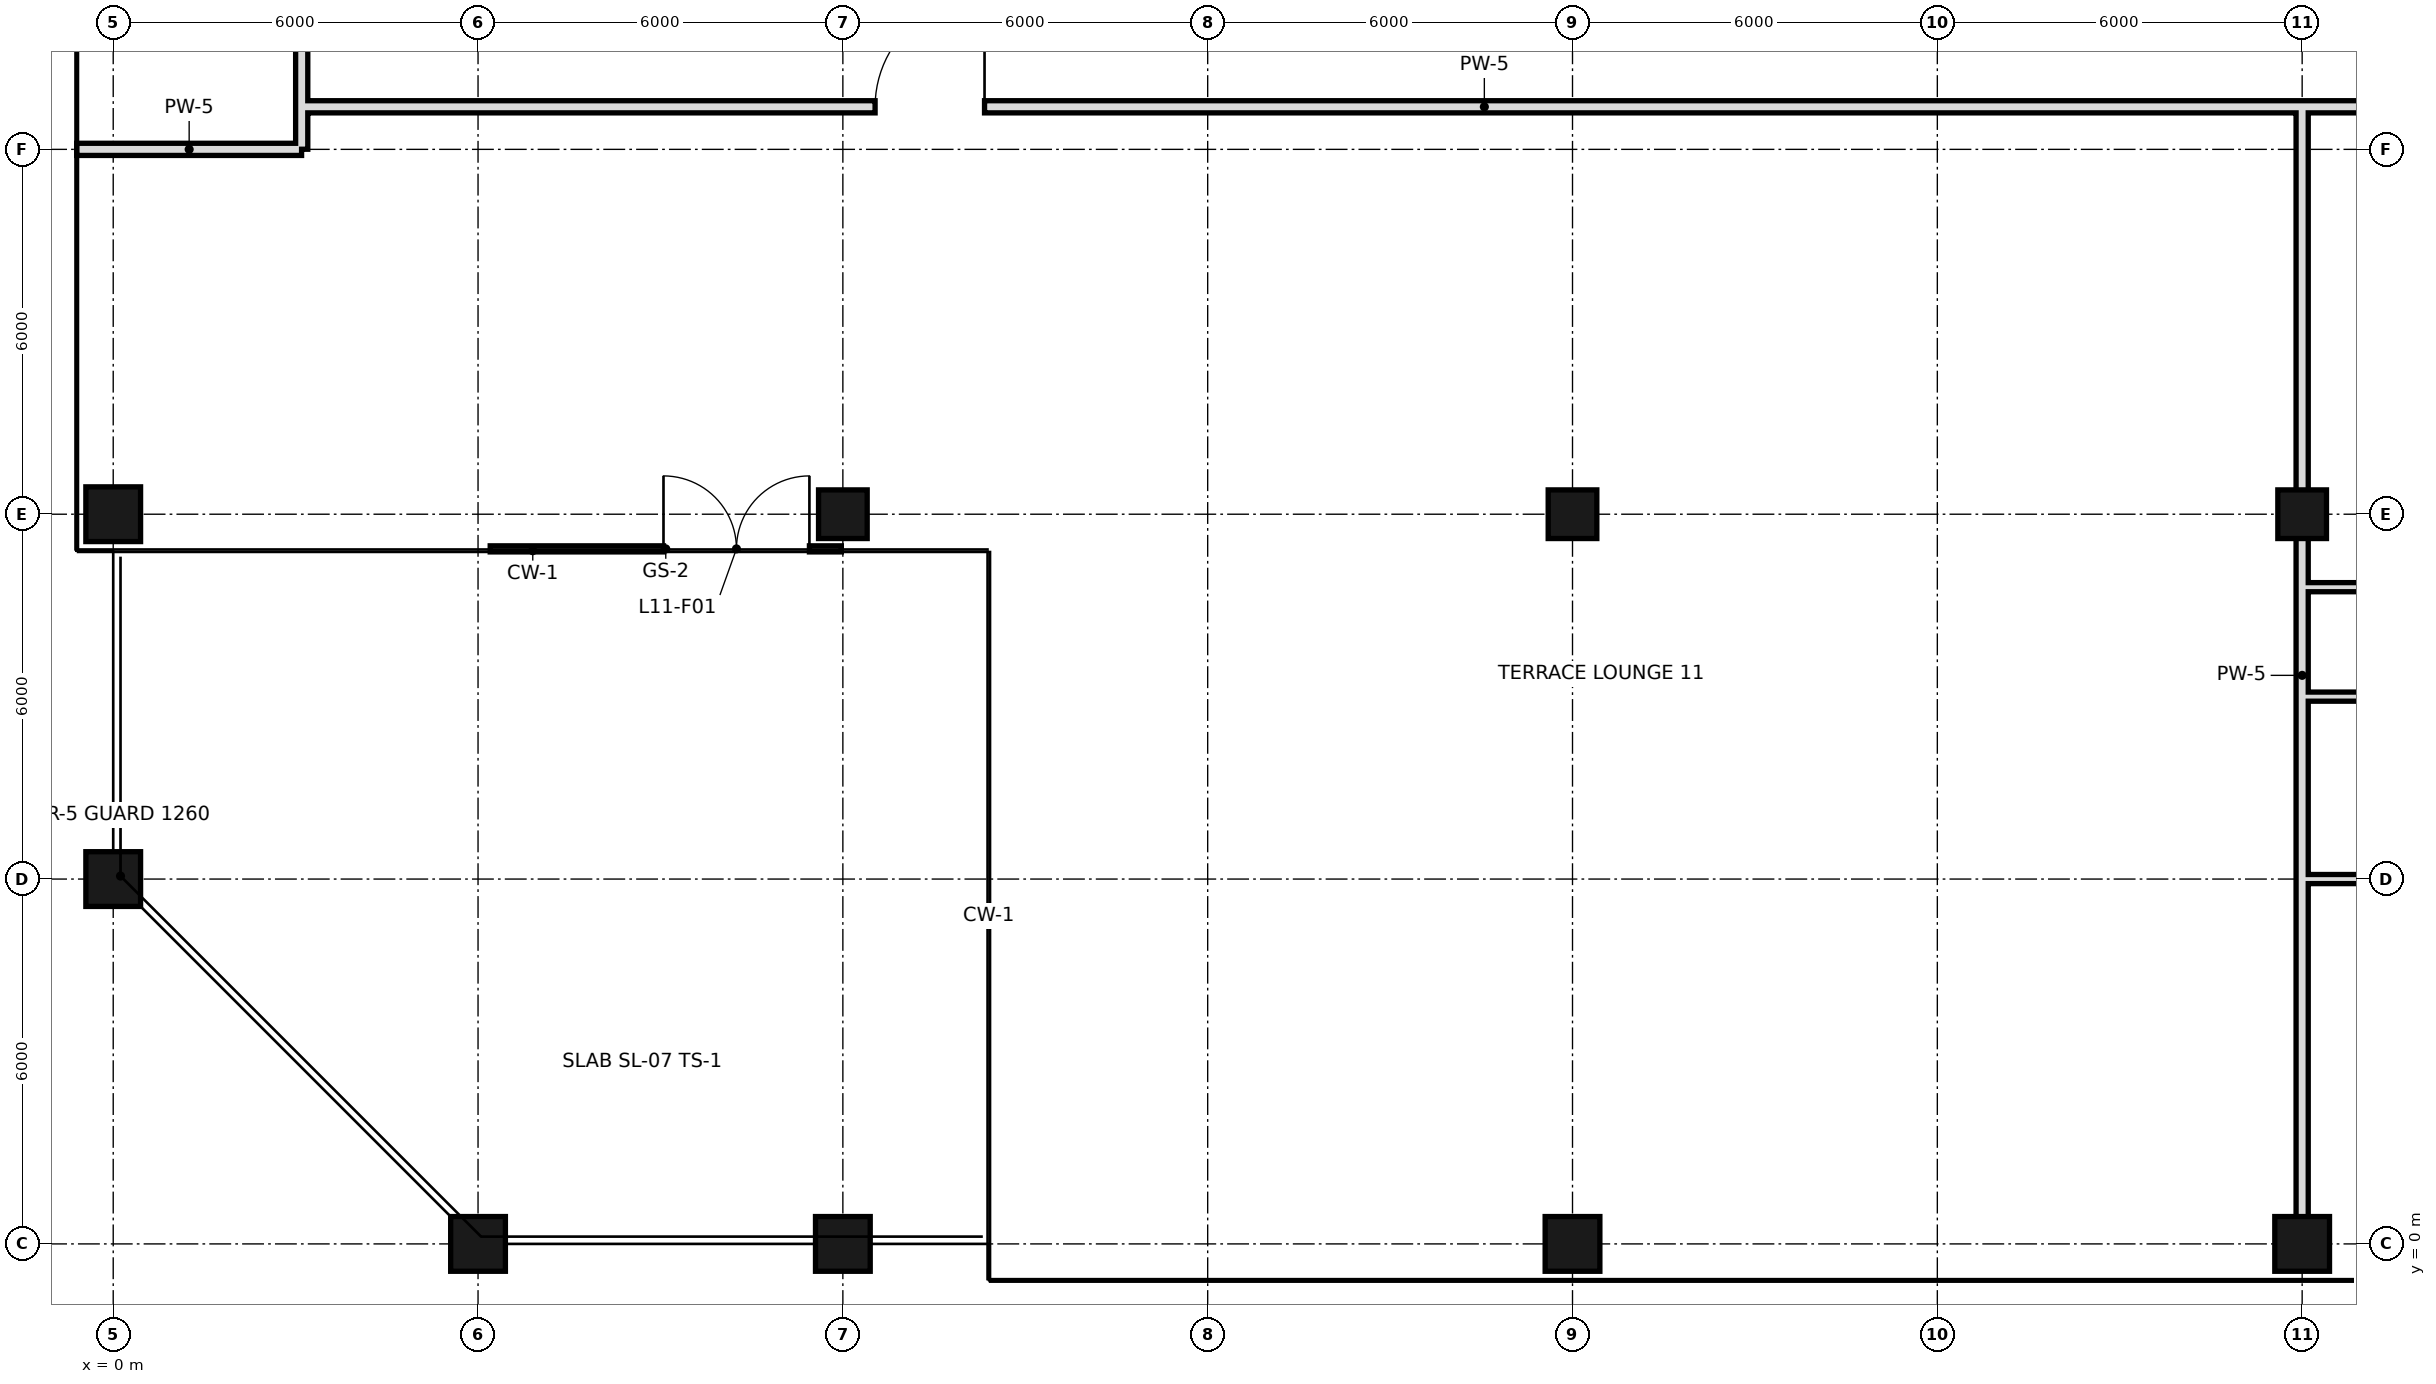
"""IFC4 building model, lengths in metres.
Left out: names, types, materials, properties, quantities, classifications, styles, units other than length and angle.
Written with IfcOpenShell. Run it as: python <this file> out.ifc"""

import sys

from ifc_helpers import new_model, si_unit, direction, frame, frame_2d, origin, origin_2d, place, context, subcontext, project, spatial, rectangle, hollow_rectangle, extrude, element, fill, save


model = new_model("IFC4")
c1 = context("Model", 3, precision=1e-05, world=origin(), true_north=direction((0.0, 1.0)))
c2 = subcontext(c1, "Body", "Model", "MODEL_VIEW")
j1 = project(units=[si_unit("LENGTHUNIT", "METRE"), si_unit("PLANEANGLEUNIT", "RADIAN")], contexts=[c1])
p1 = place(None, origin())
s1 = spatial("IfcSite", under=j1, at=p1, CompositionType="ELEMENT")
p2 = place(p1, origin())
s2 = spatial("IfcBuilding", under=s1, at=p2, CompositionType="ELEMENT")
p3 = place(p2, frame((0.0, 0.0, 60.6)))
s3 = spatial("IfcBuildingStorey", under=s2, at=p3, CompositionType="ELEMENT", Elevation=60.6)
for number, where, z_axis, x_axis in (
    (1, (0.0, 6.0, 0.0), (0.0, 0.0, 1.0), (1.0, 0.0, 0.0)),
    (2, (0.0, 12.0, 0.0), (0.0, 0.0, 1.0), (1.0, 0.0, 0.0)),
    (3, (6.0, 0.0, 0.0), (0.0, 0.0, 1.0), (1.0, 0.0, 0.0)),
    (4, (12.0, 0.0, 0.0), (0.0, 0.0, 1.0), (1.0, 0.0, 0.0)),
):
    element("IfcColumn", number, at=place(p3, frame(where, z_axis=z_axis, x_axis=x_axis)), inside=s3, PredefinedType="COLUMN", context=c2, shape_type="SweptSolid", body=[
        extrude(hollow_rectangle(XDim=0.9, YDim=0.9, WallThickness=0.045, at=origin_2d()), origin(), (0.0, 0.0, 1.0), 3.6),
    ])
p4 = place(p3, frame((12.0, 12.0, 0.0), z_axis=(0.0, 0.0, 1.0), x_axis=(1.0, 0.0, 0.0)))
e5 = element("IfcColumn", 5, at=p4, inside=s3, PredefinedType="COLUMN", context=c2, shape_type="SweptSolid", body=[
    extrude(hollow_rectangle(XDim=0.8, YDim=0.8, WallThickness=0.04, at=origin_2d()), origin(), (0.0, 0.0, 1.0), 3.6),
])
p5 = place(p3, frame((24.0, 0.0, 0.0), z_axis=(0.0, 0.0, 1.0), x_axis=(1.0, 0.0, 0.0)))
e6 = element("IfcColumn", 6, at=p5, inside=s3, PredefinedType="COLUMN", context=c2, shape_type="SweptSolid", body=[
    extrude(hollow_rectangle(XDim=0.9, YDim=0.9, WallThickness=0.045, at=origin_2d()), origin(), (0.0, 0.0, 1.0), 3.6),
])
p6 = place(p3, frame((24.0, 12.0, 0.0), z_axis=(0.0, 0.0, 1.0), x_axis=(1.0, 0.0, 0.0)))
e7 = element("IfcColumn", 7, at=p6, inside=s3, PredefinedType="COLUMN", context=c2, shape_type="SweptSolid", body=[
    extrude(hollow_rectangle(XDim=0.8, YDim=0.8, WallThickness=0.04, at=origin_2d()), origin(), (0.0, 0.0, 1.0), 3.6),
])
p7 = place(p3, frame((36.0, 0.0, 0.0), z_axis=(0.0, 0.0, 1.0), x_axis=(1.0, 0.0, 0.0)))
e8 = element("IfcColumn", 8, at=p7, inside=s3, PredefinedType="COLUMN", context=c2, shape_type="SweptSolid", body=[
    extrude(hollow_rectangle(XDim=0.9, YDim=0.9, WallThickness=0.045, at=origin_2d()), origin(), (0.0, 0.0, 1.0), 3.6),
])
p8 = place(p3, frame((36.0, 12.0, 0.0), z_axis=(0.0, 0.0, 1.0), x_axis=(1.0, 0.0, 0.0)))
e9 = element("IfcColumn", 9, at=p8, inside=s3, PredefinedType="COLUMN", context=c2, shape_type="SweptSolid", body=[
    extrude(hollow_rectangle(XDim=0.8, YDim=0.8, WallThickness=0.04, at=origin_2d()), origin(), (0.0, 0.0, 1.0), 3.6),
])
p9 = place(p3, frame((6.2, 11.43, 0.0), z_axis=(0.0, 0.0, 1.0), x_axis=(1.0, 0.0, 0.0)))
e10 = element("IfcWall", 10, at=p9, inside=s3, PredefinedType="SOLIDWALL", context=c2, shape_type="SweptSolid", body=[
    extrude(rectangle(XDim=5.775, YDim=0.1, at=frame_2d((2.888, 0.0))), origin(), (0.0, 0.0, 1.0), 3.42),
])
p10 = place(p9, frame((2.85, 0.0, 0.0)))
e11 = element("IfcOpeningElement", 11, at=p10, cuts=e10, PredefinedType="OPENING", context=c2, shape_type="SweptSolid", body=[
    extrude(rectangle(XDim=2.4, YDim=2.4, at=frame_2d((1.2, 1.2))), frame((0.0, 0.06, 0.0), z_axis=(0.0, -1.0, 0.0), x_axis=(1.0, 0.0, 0.0)), (0.0, 0.0, 1.0), 0.12),
])
p11 = place(p3, frame((3.1, 18.002, 0.0), z_axis=(0.0, 0.0, 1.0), x_axis=(0.0, 1.0, 0.0)))
e12 = element("IfcWall", 12, at=p11, inside=s3, PredefinedType="SOLIDWALL", context=c2, shape_type="SweptSolid", body=[
    extrude(rectangle(XDim=27.947, YDim=0.2, at=frame_2d((13.974, 0.0))), origin(), (0.0, 0.0, 1.0), 2.97),
])
p12 = place(p11, frame((13.3, 0.0, 0.0)))
e13 = element("IfcOpeningElement", 13, at=p12, cuts=e12, PredefinedType="OPENING", context=c2, shape_type="SweptSolid", body=[
    extrude(rectangle(XDim=1.2, YDim=2.4, at=frame_2d((0.6, 1.2))), frame((0.0, 0.11, 0.0), z_axis=(0.0, -1.0, 0.0), x_axis=(1.0, 0.0, 0.0)), (0.0, 0.0, 1.0), 0.22),
])
p13 = place(p3, frame((36.0, 0.0, 0.0), z_axis=(0.0, 0.0, 1.0), x_axis=(0.0, 1.0, 0.0)))
e14 = element("IfcWall", 14, at=p13, inside=s3, PredefinedType="SOLIDWALL", context=c2, shape_type="SweptSolid", body=[
    extrude(rectangle(XDim=18.7, YDim=0.2, at=frame_2d((9.35, 0.0))), origin(), (0.0, 0.0, 1.0), 2.72),
])
p14 = place(p3, frame((36.0, 10.8, 0.0), z_axis=(0.0, 0.0, 1.0), x_axis=(1.0, 0.0, 0.0)))
e15 = element("IfcWall", 15, at=p14, inside=s3, PredefinedType="PARTITIONING", context=c2, shape_type="SweptSolid", body=[
    extrude(rectangle(XDim=6.0, YDim=0.15, at=frame_2d((3.0, 0.0))), origin(), (0.0, 0.0, 1.0), 3.42),
])
p15 = place(p14, frame((1.6, 0.0, 0.0)))
e16 = element("IfcOpeningElement", 16, at=p15, cuts=e15, PredefinedType="OPENING", context=c2, shape_type="SweptSolid", body=[
    extrude(rectangle(XDim=1.0, YDim=2.4, at=frame_2d((0.5, 1.2))), frame((0.0, 0.085, 0.0), z_axis=(0.0, -1.0, 0.0), x_axis=(1.0, 0.0, 0.0)), (0.0, 0.0, 1.0), 0.17),
])
p16 = place(p3, frame((-0.6, 18.0, 0.0), z_axis=(0.0, 0.0, 1.0), x_axis=(1.0, 0.0, 0.0)))
e17 = element("IfcWall", 17, at=p16, inside=s3, PredefinedType="SOLIDWALL", context=c2, shape_type="SweptSolid", body=[
    extrude(rectangle(XDim=3.698, YDim=0.2, at=frame_2d((1.849, 0.0))), origin(), (0.0, 0.0, 1.0), 2.72),
])
p17 = place(p3, frame((3.1, 18.7, 0.0), z_axis=(0.0, 0.0, 1.0), x_axis=(1.0, 0.0, 0.0)))
e18 = element("IfcWall", 18, at=p17, inside=s3, PredefinedType="SOLIDWALL", context=c2, shape_type="SweptSolid", body=[
    extrude(rectangle(XDim=38.9, YDim=0.2, at=frame_2d((19.45, 0.0))), origin(), (0.0, 0.0, 1.0), 2.72),
])
p18 = place(p17, frame((34.44, 0.0, 0.0)))
e19 = element("IfcOpeningElement", 19, at=p18, cuts=e18, PredefinedType="OPENING", context=c2, shape_type="SweptSolid", body=[
    extrude(rectangle(XDim=1.2, YDim=2.4, at=frame_2d((0.6, 1.2))), frame((0.0, 0.11, 0.0), z_axis=(0.0, -1.0, 0.0), x_axis=(1.0, 0.0, 0.0)), (0.0, 0.0, 1.0), 0.22),
])
p19 = place(p17, frame((9.43, 0.0, 0.0)))
e20 = element("IfcOpeningElement", 20, at=p19, cuts=e18, PredefinedType="OPENING", context=c2, shape_type="SweptSolid", body=[
    extrude(rectangle(XDim=1.8, YDim=2.4, at=frame_2d((0.9, 1.2))), frame((0.0, 0.11, 0.0), z_axis=(0.0, -1.0, 0.0), x_axis=(1.0, 0.0, 0.0)), (0.0, 0.0, 1.0), 0.22),
])
p20 = place(p3, frame((36.0, 6.0, 0.0), z_axis=(0.0, 0.0, 1.0), x_axis=(1.0, 0.0, 0.0)))
e21 = element("IfcWall", 21, at=p20, inside=s3, PredefinedType="PARTITIONING", context=c2, shape_type="SweptSolid", body=[
    extrude(rectangle(XDim=12.0, YDim=0.15, at=frame_2d((6.0, 0.0))), origin(), (0.0, 0.0, 1.0), 2.97),
])
p21 = place(p20, frame((3.16, 0.0, 0.0)))
e22 = element("IfcOpeningElement", 22, at=p21, cuts=e21, PredefinedType="OPENING", context=c2, shape_type="SweptSolid", body=[
    extrude(rectangle(XDim=1.8, YDim=2.4, at=frame_2d((0.9, 1.2))), frame((0.0, 0.085, 0.0), z_axis=(0.0, -1.0, 0.0), x_axis=(1.0, 0.0, 0.0)), (0.0, 0.0, 1.0), 0.17),
])
p22 = place(p3, frame((36.0, 9.0, 0.0), z_axis=(0.0, 0.0, 1.0), x_axis=(1.0, 0.0, 0.0)))
e23 = element("IfcWall", 23, at=p22, inside=s3, PredefinedType="PARTITIONING", context=c2, shape_type="SweptSolid", body=[
    extrude(rectangle(XDim=12.0, YDim=0.15, at=frame_2d((6.0, 0.0))), origin(), (0.0, 0.0, 1.0), 3.42),
])
p23 = place(p22, frame((7.04, 0.0, 0.0)))
e24 = element("IfcOpeningElement", 24, at=p23, cuts=e23, PredefinedType="OPENING", context=c2, shape_type="SweptSolid", body=[
    extrude(rectangle(XDim=1.8, YDim=2.4, at=frame_2d((0.9, 1.2))), frame((0.0, 0.085, 0.0), z_axis=(0.0, -1.0, 0.0), x_axis=(1.0, 0.0, 0.0)), (0.0, 0.0, 1.0), 0.17),
])
p24 = place(p10, origin())
e25 = element("IfcDoor", 25, at=p24, inside=s3, OperationType="DOUBLE_DOOR_SINGLE_SWING", PredefinedType="DOOR", context=c2, shape_type="SweptSolid", body=[
    extrude(rectangle(XDim=2.4, YDim=2.4, at=frame_2d((1.2, 1.2))), frame((0.0, 0.025, 0.0), z_axis=(0.0, -1.0, 0.0), x_axis=(1.0, 0.0, 0.0)), (0.0, 0.0, 1.0), 0.05),
])
fill(e11, e25)
p25 = place(p19, frame((1.8, 0.0, 0.0), z_axis=(0.0, 0.0, 1.0), x_axis=(-1.0, 0.0, 0.0)))
e26 = element("IfcDoor", 26, at=p25, inside=s3, OperationType="SINGLE_SWING_LEFT", PredefinedType="DOOR", context=c2, shape_type="SweptSolid", body=[
    extrude(rectangle(XDim=1.8, YDim=2.4, at=frame_2d((0.9, 1.2))), frame((0.0, 0.025, 0.0), z_axis=(0.0, -1.0, 0.0), x_axis=(1.0, 0.0, 0.0)), (0.0, 0.0, 1.0), 0.05),
])
fill(e20, e26)
save(model, sys.argv[1])
